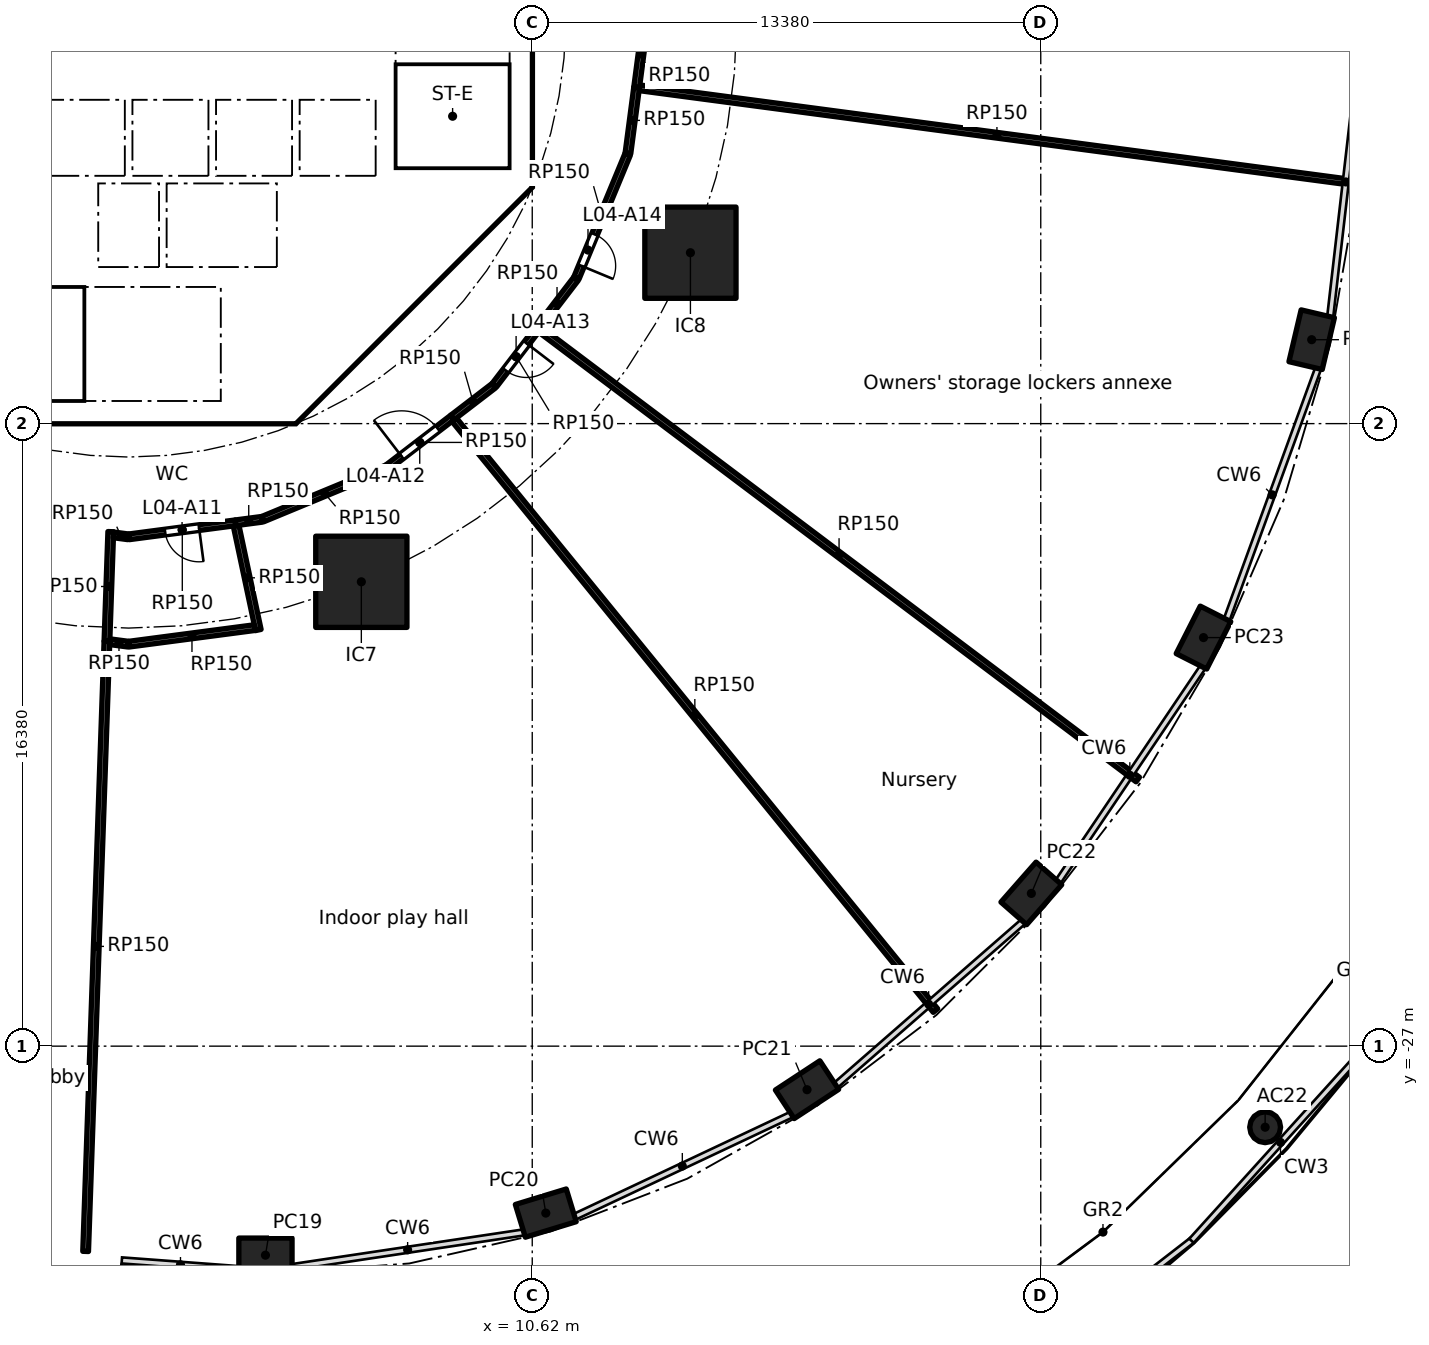
"""IFC4 building model, lengths in metres.
Left out: names, types, materials, properties, quantities, classifications, styles, units other than length and angle.
Written with IfcOpenShell. Run it as: python <this file> out.ifc"""

import sys

from ifc_helpers import new_model, si_unit, direction, frame, frame_2d, origin, origin_2d, place, context, subcontext, project, spatial, polyline, rectangle, hollow_rectangle, hollow_circle, outline, extrude, element, fill, save


model = new_model("IFC4")
c1 = context("Model", 3, precision=1e-05, world=origin(), true_north=direction((0.0, 1.0)))
c2 = subcontext(c1, "Body", "Model", "MODEL_VIEW")
j1 = project(units=[si_unit("LENGTHUNIT", "METRE"), si_unit("PLANEANGLEUNIT", "RADIAN")], contexts=[c1])
p1 = place(None, origin())
s1 = spatial("IfcSite", under=j1, at=p1, CompositionType="ELEMENT")
p2 = place(p1, origin())
s2 = spatial("IfcBuilding", under=s1, at=p2, CompositionType="ELEMENT")
p3 = place(p2, frame((0.0, 0.0, 22.0)))
s3 = spatial("IfcBuildingStorey", under=s2, at=p3, CompositionType="ELEMENT", Elevation=22.0)
for number, where, z_axis, x_axis in (
    (1, (3.6, -32.5, 0.0), (0.0, 0.0, 1.0), (1.0, 0.0, 0.0)),
    (2, (10.976, -31.393, 0.0), (0.0, 0.0, 1.0), (0.957, 0.292, 0.0)),
    (3, (17.85, -28.146, 0.0), (0.0, 0.0, 1.0), (0.836, 0.549, 0.0)),
    (4, (23.752, -22.981, 0.0), (0.0, 0.0, 1.0), (0.66, 0.751, 0.0)),
    (5, (28.282, -16.25, 0.0), (0.0, 0.0, 1.0), (0.452, 0.892, 0.0)),
    (6, (31.129, -8.412, 0.0), (0.0, 0.0, 1.0), (0.229, 0.973, 0.0)),
):
    element("IfcColumn", number, at=place(p3, frame(where, z_axis=z_axis, x_axis=x_axis)), inside=s3, PredefinedType="COLUMN", context=c2, shape_type="SweptSolid", body=[
        extrude(hollow_rectangle(XDim=1.4, YDim=0.9, WallThickness=0.05, at=origin_2d()), origin(), (0.0, 0.0, 1.0), 5.0),
    ])
for number, where, z_axis, x_axis in (
    (7, (6.123, -14.782, 0.0), (0.0, 0.0, 1.0), (1.0, 0.0, 0.0)),
    (8, (14.782, -6.123, 0.0), (0.0, 0.0, 1.0), (1.0, 0.0, 0.0)),
):
    element("IfcColumn", number, at=place(p3, frame(where, z_axis=z_axis, x_axis=x_axis)), inside=s3, PredefinedType="COLUMN", context=c2, shape_type="SweptSolid", body=[
        extrude(rectangle(XDim=2.4, YDim=2.4, at=origin_2d()), origin(), (0.0, 0.0, 1.0), 5.0),
    ])
p4 = place(p3, frame((29.904, -29.133, 0.0), z_axis=(0.0, 0.0, 1.0), x_axis=(1.0, 0.0, 0.0)))
e9 = element("IfcColumn", 9, at=p4, inside=s3, PredefinedType="COLUMN", context=c2, shape_type="SweptSolid", body=[
    extrude(hollow_circle(Radius=0.406, WallThickness=0.025, at=origin_2d()), origin(), (0.0, 0.0, 1.0), 5.0),
])
p5 = place(p3, frame((4.613, -9.988, 0.0), z_axis=(0.0, 0.0, 1.0), x_axis=(0.707106781187, 0.707106781187, 0.0)))
e10 = element("IfcWall", 10, at=p5, inside=s3, PredefinedType="SHEAR", context=c2, shape_type="SweptSolid", body=[
    extrude(rectangle(XDim=7.602, YDim=0.6, at=frame_2d((3.801, 0.0))), origin(), (0.0, 0.0, 1.0), 4.74),
])
p6 = place(p5, frame((3.201, 0.0, 0.0)))
e11 = element("IfcOpeningElement", 11, at=p6, cuts=e10, PredefinedType="OPENING", context=c2, shape_type="SweptSolid", body=[
    extrude(rectangle(XDim=1.2, YDim=2.1, at=frame_2d((0.6, 1.05))), frame((0.0, 0.31, 0.0), z_axis=(0.0, -1.0, 0.0), x_axis=(1.0, 0.0, 0.0)), (0.0, 0.0, 1.0), 0.62),
])
p7 = place(p3, frame((4.0, -10.025, 0.0), z_axis=(0.0, 0.0, 1.0), x_axis=(0.0, 1.0, 0.0)))
e12 = element("IfcWall", 12, at=p7, inside=s3, PredefinedType="SOLIDWALL", context=c2, shape_type="SweptSolid", body=[
    extrude(rectangle(XDim=3.0, YDim=0.2, at=frame_2d((1.5, 0.0))), origin(), (0.0, 0.0, 1.0), 4.74),
])
p8 = place(p7, frame((0.975, 0.0, 0.0)))
e13 = element("IfcOpeningElement", 13, at=p8, cuts=e12, PredefinedType="OPENING", context=c2, shape_type="SweptSolid", body=[
    extrude(rectangle(XDim=1.1, YDim=2.1, at=frame_2d((0.55, 1.05))), frame((0.0, 0.11, 0.0), z_axis=(0.0, -1.0, 0.0), x_axis=(1.0, 0.0, 0.0)), (0.0, 0.0, 1.0), 0.22),
])
p9 = place(p3, frame((4.0, -6.5, 0.0), z_axis=(0.0, 0.0, 1.0), x_axis=(0.0, 1.0, 0.0)))
e14 = element("IfcWall", 14, at=p9, inside=s3, PredefinedType="SOLIDWALL", context=c2, shape_type="SweptSolid", body=[
    extrude(rectangle(XDim=2.2, YDim=0.2, at=frame_2d((1.1, 0.0))), origin(), (0.0, 0.0, 1.0), 4.74),
])
p10 = place(p9, frame((0.55, 0.0, 0.0)))
e15 = element("IfcOpeningElement", 15, at=p10, cuts=e14, PredefinedType="OPENING", context=c2, shape_type="SweptSolid", body=[
    extrude(rectangle(XDim=1.1, YDim=2.1, at=frame_2d((0.55, 1.05))), frame((0.0, 0.11, 0.0), z_axis=(0.0, -1.0, 0.0), x_axis=(1.0, 0.0, 0.0)), (0.0, 0.0, 1.0), 0.22),
])
p11 = place(p3, frame((-6.7, -2.0, 0.0), z_axis=(0.0, 0.0, 1.0), x_axis=(1.0, 0.0, 0.0)))
e16 = element("IfcWall", 16, at=p11, inside=s3, PredefinedType="SOLIDWALL", context=c2, shape_type="SweptSolid", body=[
    extrude(rectangle(XDim=13.4, YDim=0.2, at=frame_2d((6.7, 0.0))), origin(), (0.0, 0.0, 1.0), 4.74),
])
p12 = place(p11, frame((0.65, 0.0, 0.0)))
e17 = element("IfcOpeningElement", 17, at=p12, cuts=e16, PredefinedType="OPENING", context=c2, shape_type="SweptSolid", body=[
    extrude(rectangle(XDim=1.1, YDim=2.1, at=frame_2d((0.55, 1.05))), frame((0.0, 0.11, 0.0), z_axis=(0.0, -1.0, 0.0), x_axis=(1.0, 0.0, 0.0)), (0.0, 0.0, 1.0), 0.22),
])
p13 = place(p11, frame((2.85, 0.0, 0.0)))
e18 = element("IfcOpeningElement", 18, at=p13, cuts=e16, PredefinedType="OPENING", context=c2, shape_type="SweptSolid", body=[
    extrude(rectangle(XDim=1.1, YDim=2.1, at=frame_2d((0.55, 1.05))), frame((0.0, 0.11, 0.0), z_axis=(0.0, -1.0, 0.0), x_axis=(1.0, 0.0, 0.0)), (0.0, 0.0, 1.0), 0.22),
])
p14 = place(p3, origin())
e19 = element("IfcWall", 19, at=p14, inside=s3, PredefinedType="SHEAR", context=c2, shape_type="SweptSolid", body=[
    extrude(outline(polyline([(-4.152, -10.025), (4.152, -10.025), (4.401, -9.776), (4.825, -10.2), (4.401, -10.625), (-4.401, -10.625), (-4.825, -10.2), (-4.401, -9.776), (-4.152, -10.025)])), origin(), (0.0, 0.0, 1.0), 4.74),
])
p15 = place(p3, origin())
e20 = element("IfcWall", 20, at=p15, inside=s3, PredefinedType="SHEAR", context=c2, shape_type="SweptSolid", body=[
    extrude(outline(polyline([(9.776, -4.401), (10.025, -4.152), (10.025, -3.801), (10.025, 4.152), (9.776, 4.401), (10.2, 4.825), (10.625, 4.401), (10.625, -4.401), (10.2, -4.825), (9.776, -4.401)])), origin(), (0.0, 0.0, 1.0), 4.74),
])
for number, where, z_axis, x_axis in (
    (21, (-0.9, -6.5, 0.0), (0.0, 0.0, 1.0), (0.0, 1.0, 0.0)),
    (22, (0.9, -6.5, 0.0), (0.0, 0.0, 1.0), (0.0, 1.0, 0.0)),
):
    element("IfcWall", number, at=place(p3, frame(where, z_axis=z_axis, x_axis=x_axis)), inside=s3, PredefinedType="SOLIDWALL", context=c2, shape_type="SweptSolid", body=[
        extrude(rectangle(XDim=2.2, YDim=0.2, at=frame_2d((1.1, 0.0))), origin(), (0.0, 0.0, 1.0), 4.74),
    ])
p16 = place(p3, origin())
e23 = element("IfcWall", 23, at=p16, inside=s3, PredefinedType="SOLIDWALL", context=c2, shape_type="SweptSolid", body=[
    extrude(outline(polyline([(-6.7, -2.1), (-6.5, -2.1), (-6.5, -4.1), (-4.5, -4.1), (-4.5, -2.1), (-4.3, -2.1), (-4.3, -4.1), (-2.3, -4.1), (-2.3, -2.1), (-2.1, -2.1), (-2.1, -4.1), (-0.1, -4.1), (-0.1, -2.1), (0.1, -2.1), (0.1, -4.1), (2.1, -4.1), (2.1, -2.1), (2.3, -2.1), (2.3, -4.1), (4.3, -4.1), (4.3, -2.1), (4.5, -2.1), (4.5, -4.1), (6.5, -4.1), (6.5, -2.1), (6.7, -2.1), (6.7, -4.3), (-6.7, -4.3), (-6.7, -2.1)])), origin(), (0.0, 0.0, 1.0), 4.74),
])
p17 = place(p3, origin())
e24 = element("IfcWall", 24, at=p17, inside=s3, PredefinedType="SOLIDWALL", context=c2, shape_type="SweptSolid", body=[
    extrude(outline(polyline([(4.1, -7.025), (-4.1, -7.025), (-4.1, -6.5), (4.1, -6.5), (4.1, -7.025)])), origin(), (0.0, 0.0, 1.0), 4.74),
])
p18 = place(p3, origin())
e25 = element("IfcWall", 25, at=p18, inside=s3, PredefinedType="SOLIDWALL", context=c2, shape_type="SweptSolid", body=[
    extrude(outline(polyline([(7.025, -3.9), (6.7, -3.9), (6.7, 3.9), (7.025, 3.9), (7.025, -3.9)])), origin(), (0.0, 0.0, 1.0), 4.74),
])
p19 = place(p3, origin())
e26 = element("IfcWall", 26, at=p19, inside=s3, PredefinedType="SOLIDWALL", context=c2, shape_type="SweptSolid", body=[
    extrude(outline(polyline([(10.025, -4.1), (6.7, -4.1), (6.7, -3.9), (10.025, -3.9), (10.025, -4.1)])), origin(), (0.0, 0.0, 1.0), 4.74),
])
p20 = place(p3, frame((-0.571, -16.349, 0.0), z_axis=(0.0, 0.0, 1.0), x_axis=(-0.034915122528, -0.999390281231, 0.0)))
e27 = element("IfcWall", 27, at=p20, inside=s3, PredefinedType="PARTITIONING", context=c2, shape_type="SweptSolid", body=[
    extrude(rectangle(XDim=16.062, YDim=0.15, at=frame_2d((8.031, 0.0))), origin(), (0.0, 0.0, 1.0), 4.74),
])
p21 = place(p3, frame((-0.47, -13.462, 0.0), z_axis=(0.0, 0.0, 1.0), x_axis=(-0.034907670303, -0.999390541557, 0.0)))
e28 = element("IfcWall", 28, at=p21, inside=s3, PredefinedType="PARTITIONING", context=c2, shape_type="SweptSolid", body=[
    extrude(rectangle(XDim=2.888, YDim=0.15, at=frame_2d((1.444, 0.0))), origin(), (0.0, 0.0, 1.0), 4.74),
])
p22 = place(p3, frame((-0.012, -16.423, 0.0), z_axis=(0.0, 0.0, 1.0), x_axis=(-0.991457697021, 0.130428658731, 0.0)))
e29 = element("IfcWall", 29, at=p22, inside=s3, PredefinedType="PARTITIONING", context=c2, shape_type="SweptSolid", body=[
    extrude(rectangle(XDim=0.489, YDim=0.15, at=frame_2d((0.244, 0.0))), origin(), (0.0, 0.0, 1.0), 4.74),
])
p23 = place(p3, frame((-0.012, -13.598, 0.0), z_axis=(0.0, 0.0, 1.0), x_axis=(-0.991467089631, 0.130357240609, 0.0)))
e30 = element("IfcWall", 30, at=p23, inside=s3, PredefinedType="PARTITIONING", context=c2, shape_type="SweptSolid", body=[
    extrude(rectangle(XDim=0.39, YDim=0.15, at=frame_2d((0.195, 0.0))), origin(), (0.0, 0.0, 1.0), 4.74),
])
p24 = place(p3, frame((2.812, -13.23, 0.0), z_axis=(0.0, 0.0, 1.0), x_axis=(-0.991445467051, -0.130521591565, 0.0)))
e31 = element("IfcWall", 31, at=p24, inside=s3, PredefinedType="PARTITIONING", context=c2, shape_type="SweptSolid", body=[
    extrude(rectangle(XDim=2.824, YDim=0.15, at=frame_2d((1.412, 0.0))), origin(), (0.0, 0.0, 1.0), 4.74),
])
p25 = place(p24, frame((0.968, 0.0, 0.0)))
e32 = element("IfcOpeningElement", 32, at=p25, cuts=e31, PredefinedType="OPENING", context=c2, shape_type="SweptSolid", body=[
    extrude(rectangle(XDim=0.9, YDim=2.1, at=frame_2d((0.45, 1.05))), frame((0.0, 0.085, 0.0), z_axis=(0.0, -1.0, 0.0), x_axis=(1.0, 0.0, 0.0)), (0.0, 0.0, 1.0), 0.17),
])
p26 = place(p3, frame((2.828, -13.303, 0.0), z_axis=(0.0, 0.0, 1.0), x_axis=(0.207920091501, -0.978145815076, 0.0)))
e33 = element("IfcWall", 33, at=p26, inside=s3, PredefinedType="PARTITIONING", context=c2, shape_type="SweptSolid", body=[
    extrude(rectangle(XDim=2.809, YDim=0.15, at=frame_2d((1.404, 0.0))), origin(), (0.0, 0.0, 1.0), 4.74),
])
p27 = place(p3, frame((3.321, -15.987, 0.0), z_axis=(0.0, 0.0, 1.0), x_axis=(-0.991441844339, -0.130549106827, 0.0)))
e34 = element("IfcWall", 34, at=p27, inside=s3, PredefinedType="PARTITIONING", context=c2, shape_type="SweptSolid", body=[
    extrude(rectangle(XDim=3.338, YDim=0.15, at=frame_2d((1.669, 0.0))), origin(), (0.0, 0.0, 1.0), 4.74),
])
p28 = place(p3, frame((3.508, -13.138, 0.0), z_axis=(0.0, 0.0, 1.0), x_axis=(-0.991460212813, -0.130409533429, 0.0)))
e35 = element("IfcWall", 35, at=p28, inside=s3, PredefinedType="PARTITIONING", context=c2, shape_type="SweptSolid", body=[
    extrude(rectangle(XDim=0.702, YDim=0.15, at=frame_2d((0.351, 0.0))), origin(), (0.0, 0.0, 1.0), 4.74),
])
p29 = place(p3, frame((6.789, -11.782, 0.0), z_axis=(0.0, 0.0, 1.0), x_axis=(-0.923881838111, -0.382677866108, 0.0)))
e36 = element("IfcWall", 36, at=p29, inside=s3, PredefinedType="PARTITIONING", context=c2, shape_type="SweptSolid", body=[
    extrude(rectangle(XDim=3.527, YDim=0.15, at=frame_2d((1.763, 0.0))), origin(), (0.0, 0.0, 1.0), 4.74),
])
p30 = place(p3, frame((8.519, -10.459, 0.0), z_axis=(0.0, 0.0, 1.0), x_axis=(-0.793372937326, -0.608735888805, 0.0)))
e37 = element("IfcWall", 37, at=p30, inside=s3, PredefinedType="PARTITIONING", context=c2, shape_type="SweptSolid", body=[
    extrude(rectangle(XDim=2.155, YDim=0.15, at=frame_2d((1.078, 0.0))), origin(), (0.0, 0.0, 1.0), 4.74),
])
p31 = place(p30, frame((0.483, 0.0, 0.0)))
e38 = element("IfcOpeningElement", 38, at=p31, cuts=e37, PredefinedType="OPENING", context=c2, shape_type="SweptSolid", body=[
    extrude(rectangle(XDim=1.2, YDim=2.1, at=frame_2d((0.6, 1.05))), frame((0.0, 0.085, 0.0), z_axis=(0.0, -1.0, 0.0), x_axis=(1.0, 0.0, 0.0)), (0.0, 0.0, 1.0), 0.17),
])
p32 = place(p3, frame((8.567, -10.517, 0.0), z_axis=(0.0, 0.0, 1.0), x_axis=(0.631550170727, -0.775335012658, 0.0)))
e39 = element("IfcWall", 39, at=p32, inside=s3, PredefinedType="PARTITIONING", context=c2, shape_type="SweptSolid", body=[
    extrude(rectangle(XDim=20.051, YDim=0.15, at=frame_2d((10.026, 0.0))), origin(), (0.0, 0.0, 1.0), 4.74),
])
p33 = place(p3, frame((9.607, -9.624, 0.0), z_axis=(0.0, 0.0, 1.0), x_axis=(-0.793371316762, -0.6087380009, 0.0)))
e40 = element("IfcWall", 40, at=p33, inside=s3, PredefinedType="PARTITIONING", context=c2, shape_type="SweptSolid", body=[
    extrude(rectangle(XDim=1.371, YDim=0.15, at=frame_2d((0.686, 0.0))), origin(), (0.0, 0.0, 1.0), 4.74),
])
p34 = place(p3, frame((10.774, -8.109, 0.0), z_axis=(0.0, 0.0, 1.0), x_axis=(-0.608754453805, -0.793358692504, 0.0)))
e41 = element("IfcWall", 41, at=p34, inside=s3, PredefinedType="PARTITIONING", context=c2, shape_type="SweptSolid", body=[
    extrude(rectangle(XDim=1.888, YDim=0.15, at=frame_2d((0.944, 0.0))), origin(), (0.0, 0.0, 1.0), 4.74),
])
p35 = place(p34, frame((0.5, 0.0, 0.0)))
e42 = element("IfcOpeningElement", 42, at=p35, cuts=e41, PredefinedType="OPENING", context=c2, shape_type="SweptSolid", body=[
    extrude(rectangle(XDim=0.9, YDim=2.1, at=frame_2d((0.45, 1.05))), frame((0.0, 0.085, 0.0), z_axis=(0.0, -1.0, 0.0), x_axis=(1.0, 0.0, 0.0)), (0.0, 0.0, 1.0), 0.17),
])
p36 = place(p3, frame((10.833, -8.154, 0.0), z_axis=(0.0, 0.0, 1.0), x_axis=(0.798984754133, -0.601351280586, 0.0)))
e43 = element("IfcWall", 43, at=p36, inside=s3, PredefinedType="PARTITIONING", context=c2, shape_type="SweptSolid", body=[
    extrude(rectangle(XDim=19.674, YDim=0.15, at=frame_2d((9.837, 0.0))), origin(), (0.0, 0.0, 1.0), 4.74),
])
p37 = place(p3, frame((11.771, -6.809, 0.0), z_axis=(0.0, 0.0, 1.0), x_axis=(-0.608716251771, -0.793388003961, 0.0)))
e44 = element("IfcWall", 44, at=p37, inside=s3, PredefinedType="PARTITIONING", context=c2, shape_type="SweptSolid", body=[
    extrude(rectangle(XDim=1.638, YDim=0.15, at=frame_2d((0.819, 0.0))), origin(), (0.0, 0.0, 1.0), 4.74),
])
p38 = place(p3, frame((13.132, -3.531, 0.0), z_axis=(0.0, 0.0, 1.0), x_axis=(-0.382677866108, -0.923881838111, 0.0)))
e45 = element("IfcWall", 45, at=p38, inside=s3, PredefinedType="PARTITIONING", context=c2, shape_type="SweptSolid", body=[
    extrude(rectangle(XDim=3.527, YDim=0.15, at=frame_2d((1.763, 0.0))), origin(), (0.0, 0.0, 1.0), 4.74),
])
p39 = place(p38, frame((2.281, 0.0, 0.0)))
e46 = element("IfcOpeningElement", 46, at=p39, cuts=e45, PredefinedType="OPENING", context=c2, shape_type="SweptSolid", body=[
    extrude(rectangle(XDim=0.9, YDim=2.1, at=frame_2d((0.45, 1.05))), frame((0.0, 0.085, 0.0), z_axis=(0.0, -1.0, 0.0), x_axis=(1.0, 0.0, 0.0)), (0.0, 0.0, 1.0), 0.17),
])
p40 = place(p3, frame((13.366, -1.774, 0.0), z_axis=(0.0, 0.0, 1.0), x_axis=(-0.130526735914, -0.991444789795, 0.0)))
e47 = element("IfcWall", 47, at=p40, inside=s3, PredefinedType="PARTITIONING", context=c2, shape_type="SweptSolid", body=[
    extrude(rectangle(XDim=1.749, YDim=0.15, at=frame_2d((0.875, 0.0))), origin(), (0.0, 0.0, 1.0), 4.74),
])
p41 = place(p3, frame((13.441, -1.784, 0.0), z_axis=(0.0, 0.0, 1.0), x_axis=(0.991305479384, -0.131580570535, 0.0)))
e48 = element("IfcWall", 48, at=p41, inside=s3, PredefinedType="PARTITIONING", context=c2, shape_type="SweptSolid", body=[
    extrude(rectangle(XDim=18.978, YDim=0.15, at=frame_2d((9.489, 0.0))), origin(), (0.0, 0.0, 1.0), 4.74),
])
p42 = place(p3, frame((13.598, -0.012, 0.0), z_axis=(0.0, 0.0, 1.0), x_axis=(-0.130472275964, -0.991451958092, 0.0)))
e49 = element("IfcWall", 49, at=p42, inside=s3, PredefinedType="PARTITIONING", context=c2, shape_type="SweptSolid", body=[
    extrude(rectangle(XDim=1.778, YDim=0.15, at=frame_2d((0.889, 0.0))), origin(), (0.0, 0.0, 1.0), 4.74),
])
p43 = place(p10, origin())
e50 = element("IfcDoor", 50, at=p43, inside=s3, OperationType="DOUBLE_DOOR_SLIDING", PredefinedType="DOOR", context=c2, shape_type="SweptSolid", body=[
    extrude(rectangle(XDim=1.1, YDim=2.1, at=frame_2d((0.55, 1.05))), frame((0.0, 0.025, 0.0), z_axis=(0.0, -1.0, 0.0), x_axis=(1.0, 0.0, 0.0)), (0.0, 0.0, 1.0), 0.05),
])
fill(e15, e50)
p44 = place(p8, origin())
e51 = element("IfcDoor", 51, at=p44, inside=s3, OperationType="SINGLE_SWING_RIGHT", PredefinedType="DOOR", context=c2, shape_type="SweptSolid", body=[
    extrude(rectangle(XDim=1.1, YDim=2.1, at=frame_2d((0.55, 1.05))), frame((0.0, 0.025, 0.0), z_axis=(0.0, -1.0, 0.0), x_axis=(1.0, 0.0, 0.0)), (0.0, 0.0, 1.0), 0.05),
])
fill(e13, e51)
p45 = place(p6, origin())
e52 = element("IfcDoor", 52, at=p45, inside=s3, OperationType="SINGLE_SWING_LEFT", PredefinedType="DOOR", context=c2, shape_type="SweptSolid", body=[
    extrude(rectangle(XDim=1.2, YDim=2.1, at=frame_2d((0.6, 1.05))), frame((0.0, 0.025, 0.0), z_axis=(0.0, -1.0, 0.0), x_axis=(1.0, 0.0, 0.0)), (0.0, 0.0, 1.0), 0.05),
])
fill(e11, e52)
p46 = place(p25, origin())
e53 = element("IfcDoor", 53, at=p46, inside=s3, OperationType="SINGLE_SWING_LEFT", PredefinedType="DOOR", context=c2, shape_type="SweptSolid", body=[
    extrude(rectangle(XDim=0.9, YDim=2.1, at=frame_2d((0.45, 1.05))), frame((0.0, 0.025, 0.0), z_axis=(0.0, -1.0, 0.0), x_axis=(1.0, 0.0, 0.0)), (0.0, 0.0, 1.0), 0.05),
])
fill(e32, e53)
p47 = place(p31, frame((1.2, 0.0, 0.0), x_axis=(-1.0, 0.0, 0.0)))
e54 = element("IfcDoor", 54, at=p47, inside=s3, OperationType="SINGLE_SWING_LEFT", PredefinedType="DOOR", context=c2, shape_type="SweptSolid", body=[
    extrude(rectangle(XDim=1.2, YDim=2.1, at=frame_2d((0.6, 1.05))), frame((0.0, 0.025, 0.0), z_axis=(0.0, -1.0, 0.0), x_axis=(1.0, 0.0, 0.0)), (0.0, 0.0, 1.0), 0.05),
])
fill(e38, e54)
p48 = place(p35, origin())
e55 = element("IfcDoor", 55, at=p48, inside=s3, OperationType="SINGLE_SWING_LEFT", PredefinedType="DOOR", context=c2, shape_type="SweptSolid", body=[
    extrude(rectangle(XDim=0.9, YDim=2.1, at=frame_2d((0.45, 1.05))), frame((0.0, 0.025, 0.0), z_axis=(0.0, -1.0, 0.0), x_axis=(1.0, 0.0, 0.0)), (0.0, 0.0, 1.0), 0.05),
])
fill(e42, e55)
p49 = place(p39, origin())
e56 = element("IfcDoor", 56, at=p49, inside=s3, OperationType="SINGLE_SWING_RIGHT", PredefinedType="DOOR", context=c2, shape_type="SweptSolid", body=[
    extrude(rectangle(XDim=0.9, YDim=2.1, at=frame_2d((0.45, 1.05))), frame((0.0, 0.025, 0.0), z_axis=(0.0, -1.0, 0.0), x_axis=(1.0, 0.0, 0.0)), (0.0, 0.0, 1.0), 0.05),
])
fill(e46, e56)
save(model, sys.argv[1])
